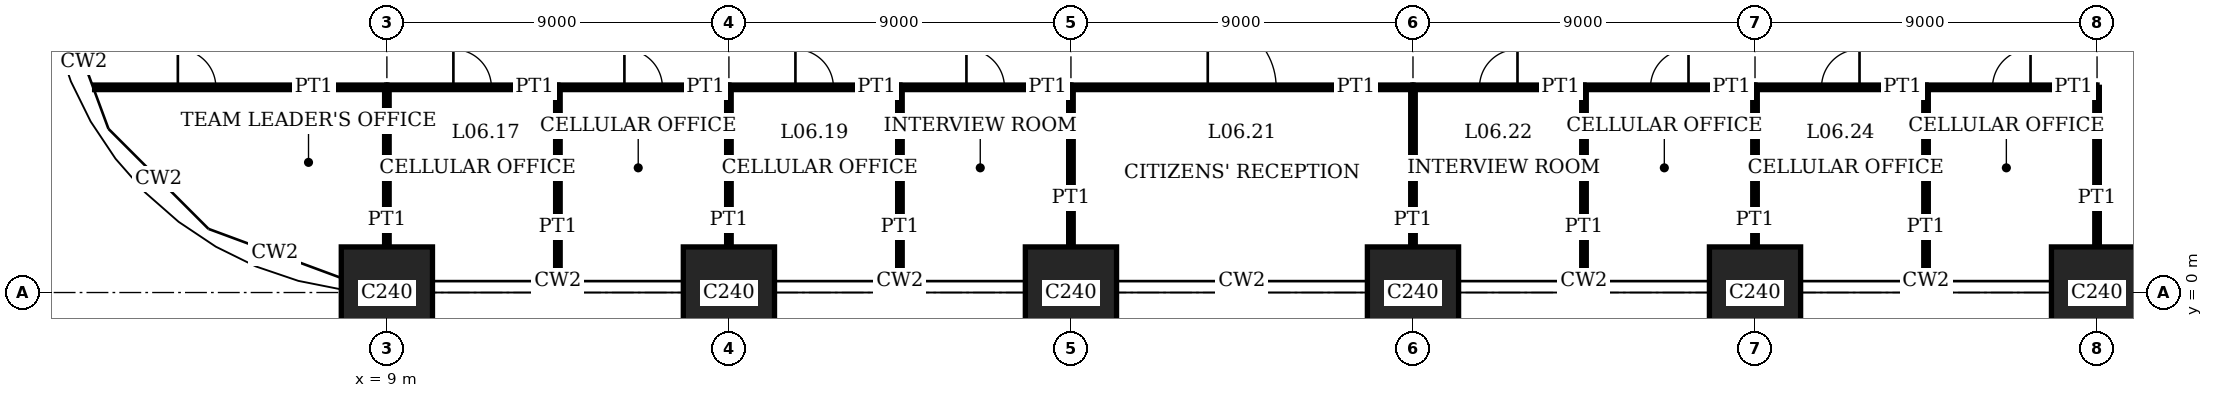
"""IFC4 building model, lengths in metres.
Left out: names, types, materials, properties, quantities, classifications, styles, units other than length and angle.
Written with IfcOpenShell. Run it as: python <this file> out.ifc"""

import sys

from ifc_helpers import new_model, si_unit, direction, frame, frame_2d, origin, origin_2d, place, context, subcontext, project, spatial, rectangle, extrude, element, fill, save


model = new_model("IFC4")
c1 = context("Model", 3, precision=1e-05, world=origin(), true_north=direction((0.0, 1.0)))
c2 = subcontext(c1, "Body", "Model", "MODEL_VIEW")
j1 = project(units=[si_unit("LENGTHUNIT", "METRE"), si_unit("PLANEANGLEUNIT", "RADIAN")], contexts=[c1])
p1 = place(None, origin())
s1 = spatial("IfcSite", under=j1, at=p1, CompositionType="ELEMENT")
p2 = place(p1, origin())
s2 = spatial("IfcBuilding", under=s1, at=p2, CompositionType="ELEMENT")
p3 = place(p2, frame((0.0, 0.0, 27.8)))
s3 = spatial("IfcBuildingStorey", under=s2, at=p3, CompositionType="ELEMENT", Elevation=27.8)
for number, where, z_axis, x_axis in (
    (1, (9.0, 0.0, 0.0), (0.0, 0.0, 1.0), (1.0, 0.0, 0.0)),
    (2, (18.0, 0.0, 0.0), (0.0, 0.0, 1.0), (1.0, 0.0, 0.0)),
    (3, (27.0, 0.0, 0.0), (0.0, 0.0, 1.0), (1.0, 0.0, 0.0)),
    (4, (36.0, 0.0, 0.0), (0.0, 0.0, 1.0), (1.0, 0.0, 0.0)),
    (5, (45.0, 0.0, 0.0), (0.0, 0.0, 1.0), (1.0, 0.0, 0.0)),
    (6, (54.0, 0.0, 0.0), (0.0, 0.0, 1.0), (1.0, 0.0, 0.0)),
):
    element("IfcColumn", number, at=place(p3, frame(where, z_axis=z_axis, x_axis=x_axis)), inside=s3, PredefinedType="COLUMN", context=c2, shape_type="SweptSolid", body=[
        extrude(rectangle(XDim=2.4, YDim=2.4, at=origin_2d()), origin(), (0.0, 0.0, 1.0), 4.0),
    ])
p4 = place(p3, frame((9.0, 5.4, 0.0), z_axis=(0.0, 0.0, 1.0), x_axis=(1.0, 0.0, 0.0)))
e7 = element("IfcWall", 7, at=p4, inside=s3, PredefinedType="PARTITIONING", context=c2, shape_type="SweptSolid", body=[
    extrude(rectangle(XDim=4.5, YDim=0.12, at=frame_2d((2.25, 0.0))), origin(), (0.0, 0.0, 1.0), 3.75),
])
p5 = place(p4, frame((1.75, 0.0, 0.0)))
e8 = element("IfcOpeningElement", 8, at=p5, cuts=e7, PredefinedType="OPENING", context=c2, shape_type="SweptSolid", body=[
    extrude(rectangle(XDim=1.0, YDim=2.4, at=frame_2d((0.5, 1.2))), frame((0.0, 0.07, 0.0), z_axis=(0.0, -1.0, 0.0), x_axis=(1.0, 0.0, 0.0)), (0.0, 0.0, 1.0), 0.14),
])
p6 = place(p3, frame((13.5, 5.4, 0.0), z_axis=(0.0, 0.0, 1.0), x_axis=(1.0, 0.0, 0.0)))
e9 = element("IfcWall", 9, at=p6, inside=s3, PredefinedType="PARTITIONING", context=c2, shape_type="SweptSolid", body=[
    extrude(rectangle(XDim=4.5, YDim=0.12, at=frame_2d((2.25, 0.0))), origin(), (0.0, 0.0, 1.0), 3.75),
])
p7 = place(p6, frame((1.75, 0.0, 0.0)))
e10 = element("IfcOpeningElement", 10, at=p7, cuts=e9, PredefinedType="OPENING", context=c2, shape_type="SweptSolid", body=[
    extrude(rectangle(XDim=1.0, YDim=2.4, at=frame_2d((0.5, 1.2))), frame((0.0, 0.07, 0.0), z_axis=(0.0, -1.0, 0.0), x_axis=(1.0, 0.0, 0.0)), (0.0, 0.0, 1.0), 0.14),
])
p8 = place(p3, frame((18.0, 5.4, 0.0), z_axis=(0.0, 0.0, 1.0), x_axis=(1.0, 0.0, 0.0)))
e11 = element("IfcWall", 11, at=p8, inside=s3, PredefinedType="PARTITIONING", context=c2, shape_type="SweptSolid", body=[
    extrude(rectangle(XDim=4.5, YDim=0.12, at=frame_2d((2.25, 0.0))), origin(), (0.0, 0.0, 1.0), 3.75),
])
p9 = place(p8, frame((1.75, 0.0, 0.0)))
e12 = element("IfcOpeningElement", 12, at=p9, cuts=e11, PredefinedType="OPENING", context=c2, shape_type="SweptSolid", body=[
    extrude(rectangle(XDim=1.0, YDim=2.4, at=frame_2d((0.5, 1.2))), frame((0.0, 0.07, 0.0), z_axis=(0.0, -1.0, 0.0), x_axis=(1.0, 0.0, 0.0)), (0.0, 0.0, 1.0), 0.14),
])
p10 = place(p3, frame((22.5, 5.4, 0.0), z_axis=(0.0, 0.0, 1.0), x_axis=(1.0, 0.0, 0.0)))
e13 = element("IfcWall", 13, at=p10, inside=s3, PredefinedType="PARTITIONING", context=c2, shape_type="SweptSolid", body=[
    extrude(rectangle(XDim=4.5, YDim=0.12, at=frame_2d((2.25, 0.0))), origin(), (0.0, 0.0, 1.0), 3.75),
])
p11 = place(p10, frame((1.75, 0.0, 0.0)))
e14 = element("IfcOpeningElement", 14, at=p11, cuts=e13, PredefinedType="OPENING", context=c2, shape_type="SweptSolid", body=[
    extrude(rectangle(XDim=1.0, YDim=2.4, at=frame_2d((0.5, 1.2))), frame((0.0, 0.07, 0.0), z_axis=(0.0, -1.0, 0.0), x_axis=(1.0, 0.0, 0.0)), (0.0, 0.0, 1.0), 0.14),
])
p12 = place(p3, frame((27.0, 5.4, 0.0), z_axis=(0.0, 0.0, 1.0), x_axis=(1.0, 0.0, 0.0)))
e15 = element("IfcWall", 15, at=p12, inside=s3, PredefinedType="PARTITIONING", context=c2, shape_type="SweptSolid", body=[
    extrude(rectangle(XDim=9.0, YDim=0.12, at=frame_2d((4.5, 0.0))), origin(), (0.0, 0.0, 1.0), 3.75),
])
p13 = place(p12, frame((3.6, 0.0, 0.0)))
e16 = element("IfcOpeningElement", 16, at=p13, cuts=e15, PredefinedType="OPENING", context=c2, shape_type="SweptSolid", body=[
    extrude(rectangle(XDim=1.8, YDim=2.4, at=frame_2d((0.9, 1.2))), frame((0.0, 0.07, 0.0), z_axis=(0.0, -1.0, 0.0), x_axis=(1.0, 0.0, 0.0)), (0.0, 0.0, 1.0), 0.14),
])
p14 = place(p3, frame((36.0, 5.4, 0.0), z_axis=(0.0, 0.0, 1.0), x_axis=(1.0, 0.0, 0.0)))
e17 = element("IfcWall", 17, at=p14, inside=s3, PredefinedType="PARTITIONING", context=c2, shape_type="SweptSolid", body=[
    extrude(rectangle(XDim=4.5, YDim=0.12, at=frame_2d((2.25, 0.0))), origin(), (0.0, 0.0, 1.0), 3.75),
])
p15 = place(p14, frame((1.75, 0.0, 0.0)))
e18 = element("IfcOpeningElement", 18, at=p15, cuts=e17, PredefinedType="OPENING", context=c2, shape_type="SweptSolid", body=[
    extrude(rectangle(XDim=1.0, YDim=2.4, at=frame_2d((0.5, 1.2))), frame((0.0, 0.07, 0.0), z_axis=(0.0, -1.0, 0.0), x_axis=(1.0, 0.0, 0.0)), (0.0, 0.0, 1.0), 0.14),
])
p16 = place(p3, frame((40.5, 5.4, 0.0), z_axis=(0.0, 0.0, 1.0), x_axis=(1.0, 0.0, 0.0)))
e19 = element("IfcWall", 19, at=p16, inside=s3, PredefinedType="PARTITIONING", context=c2, shape_type="SweptSolid", body=[
    extrude(rectangle(XDim=4.5, YDim=0.12, at=frame_2d((2.25, 0.0))), origin(), (0.0, 0.0, 1.0), 3.75),
])
p17 = place(p16, frame((1.75, 0.0, 0.0)))
e20 = element("IfcOpeningElement", 20, at=p17, cuts=e19, PredefinedType="OPENING", context=c2, shape_type="SweptSolid", body=[
    extrude(rectangle(XDim=1.0, YDim=2.4, at=frame_2d((0.5, 1.2))), frame((0.0, 0.07, 0.0), z_axis=(0.0, -1.0, 0.0), x_axis=(1.0, 0.0, 0.0)), (0.0, 0.0, 1.0), 0.14),
])
p18 = place(p3, frame((45.0, 5.4, 0.0), z_axis=(0.0, 0.0, 1.0), x_axis=(1.0, 0.0, 0.0)))
e21 = element("IfcWall", 21, at=p18, inside=s3, PredefinedType="PARTITIONING", context=c2, shape_type="SweptSolid", body=[
    extrude(rectangle(XDim=4.5, YDim=0.12, at=frame_2d((2.25, 0.0))), origin(), (0.0, 0.0, 1.0), 3.75),
])
p19 = place(p18, frame((1.75, 0.0, 0.0)))
e22 = element("IfcOpeningElement", 22, at=p19, cuts=e21, PredefinedType="OPENING", context=c2, shape_type="SweptSolid", body=[
    extrude(rectangle(XDim=1.0, YDim=2.4, at=frame_2d((0.5, 1.2))), frame((0.0, 0.07, 0.0), z_axis=(0.0, -1.0, 0.0), x_axis=(1.0, 0.0, 0.0)), (0.0, 0.0, 1.0), 0.14),
])
p20 = place(p3, frame((49.5, 5.4, 0.0), z_axis=(0.0, 0.0, 1.0), x_axis=(1.0, 0.0, 0.0)))
e23 = element("IfcWall", 23, at=p20, inside=s3, PredefinedType="PARTITIONING", context=c2, shape_type="SweptSolid", body=[
    extrude(rectangle(XDim=4.5, YDim=0.12, at=frame_2d((2.25, 0.0))), origin(), (0.0, 0.0, 1.0), 3.75),
])
p21 = place(p20, frame((1.75, 0.0, 0.0)))
e24 = element("IfcOpeningElement", 24, at=p21, cuts=e23, PredefinedType="OPENING", context=c2, shape_type="SweptSolid", body=[
    extrude(rectangle(XDim=1.0, YDim=2.4, at=frame_2d((0.5, 1.2))), frame((0.0, 0.07, 0.0), z_axis=(0.0, -1.0, 0.0), x_axis=(1.0, 0.0, 0.0)), (0.0, 0.0, 1.0), 0.14),
])
p22 = place(p3, frame((1.31, 5.4, 0.0), z_axis=(0.0, 0.0, 1.0), x_axis=(1.0, 0.0, 0.0)))
e25 = element("IfcWall", 25, at=p22, inside=s3, PredefinedType="PARTITIONING", context=c2, shape_type="SweptSolid", body=[
    extrude(rectangle(XDim=7.69, YDim=0.12, at=frame_2d((3.845, 0.0))), origin(), (0.0, 0.0, 1.0), 3.75),
])
p23 = place(p22, frame((2.19, 0.0, 0.0)))
e26 = element("IfcOpeningElement", 26, at=p23, cuts=e25, PredefinedType="OPENING", context=c2, shape_type="SweptSolid", body=[
    extrude(rectangle(XDim=1.0, YDim=2.4, at=frame_2d((0.5, 1.2))), frame((0.0, 0.07, 0.0), z_axis=(0.0, -1.0, 0.0), x_axis=(1.0, 0.0, 0.0)), (0.0, 0.0, 1.0), 0.14),
])
p24 = place(p3, frame((9.0, 1.2, 0.0), z_axis=(0.0, 0.0, 1.0), x_axis=(0.0, 1.0, 0.0)))
e27 = element("IfcWall", 27, at=p24, inside=s3, PredefinedType="PARTITIONING", context=c2, shape_type="SweptSolid", body=[
    extrude(rectangle(XDim=4.2, YDim=0.12, at=frame_2d((2.1, 0.0))), origin(), (0.0, 0.0, 1.0), 3.05),
])
p25 = place(p3, frame((13.5, 0.31, 0.0), z_axis=(0.0, 0.0, 1.0), x_axis=(0.0, 1.0, 0.0)))
e28 = element("IfcWall", 28, at=p25, inside=s3, PredefinedType="PARTITIONING", context=c2, shape_type="SweptSolid", body=[
    extrude(rectangle(XDim=5.09, YDim=0.12, at=frame_2d((2.545, 0.0))), origin(), (0.0, 0.0, 1.0), 3.75),
])
p26 = place(p3, frame((18.0, 1.2, 0.0), z_axis=(0.0, 0.0, 1.0), x_axis=(0.0, 1.0, 0.0)))
e29 = element("IfcWall", 29, at=p26, inside=s3, PredefinedType="PARTITIONING", context=c2, shape_type="SweptSolid", body=[
    extrude(rectangle(XDim=4.2, YDim=0.12, at=frame_2d((2.1, 0.0))), origin(), (0.0, 0.0, 1.0), 3.05),
])
p27 = place(p3, frame((22.5, 0.31, 0.0), z_axis=(0.0, 0.0, 1.0), x_axis=(0.0, 1.0, 0.0)))
e30 = element("IfcWall", 30, at=p27, inside=s3, PredefinedType="PARTITIONING", context=c2, shape_type="SweptSolid", body=[
    extrude(rectangle(XDim=5.09, YDim=0.12, at=frame_2d((2.545, 0.0))), origin(), (0.0, 0.0, 1.0), 3.75),
])
for number, where, z_axis, x_axis in (
    (31, (27.0, 1.2, 0.0), (0.0, 0.0, 1.0), (0.0, 1.0, 0.0)),
    (32, (36.0, 1.2, 0.0), (0.0, 0.0, 1.0), (0.0, 1.0, 0.0)),
):
    element("IfcWall", number, at=place(p3, frame(where, z_axis=z_axis, x_axis=x_axis)), inside=s3, PredefinedType="PARTITIONING", context=c2, shape_type="SweptSolid", body=[
        extrude(rectangle(XDim=4.2, YDim=0.12, at=frame_2d((2.1, 0.0))), origin(), (0.0, 0.0, 1.0), 3.05),
    ])
p28 = place(p3, frame((40.5, 0.31, 0.0), z_axis=(0.0, 0.0, 1.0), x_axis=(0.0, 1.0, 0.0)))
e33 = element("IfcWall", 33, at=p28, inside=s3, PredefinedType="PARTITIONING", context=c2, shape_type="SweptSolid", body=[
    extrude(rectangle(XDim=5.09, YDim=0.12, at=frame_2d((2.545, 0.0))), origin(), (0.0, 0.0, 1.0), 3.75),
])
p29 = place(p3, frame((45.0, 1.2, 0.0), z_axis=(0.0, 0.0, 1.0), x_axis=(0.0, 1.0, 0.0)))
e34 = element("IfcWall", 34, at=p29, inside=s3, PredefinedType="PARTITIONING", context=c2, shape_type="SweptSolid", body=[
    extrude(rectangle(XDim=4.2, YDim=0.12, at=frame_2d((2.1, 0.0))), origin(), (0.0, 0.0, 1.0), 3.05),
])
p30 = place(p3, frame((49.5, 0.31, 0.0), z_axis=(0.0, 0.0, 1.0), x_axis=(0.0, 1.0, 0.0)))
e35 = element("IfcWall", 35, at=p30, inside=s3, PredefinedType="PARTITIONING", context=c2, shape_type="SweptSolid", body=[
    extrude(rectangle(XDim=5.09, YDim=0.12, at=frame_2d((2.545, 0.0))), origin(), (0.0, 0.0, 1.0), 3.75),
])
p31 = place(p3, frame((54.0, 1.2, 0.0), z_axis=(0.0, 0.0, 1.0), x_axis=(0.0, 1.0, 0.0)))
e36 = element("IfcWall", 36, at=p31, inside=s3, PredefinedType="PARTITIONING", context=c2, shape_type="SweptSolid", body=[
    extrude(rectangle(XDim=4.2, YDim=0.12, at=frame_2d((2.1, 0.0))), origin(), (0.0, 0.0, 1.0), 3.05),
])
p32 = place(p5, origin())
e37 = element("IfcDoor", 37, at=p32, inside=s3, OperationType="SINGLE_SWING_RIGHT", PredefinedType="DOOR", context=c2, shape_type="SweptSolid", body=[
    extrude(rectangle(XDim=1.0, YDim=2.4, at=frame_2d((0.5, 1.2))), frame((0.0, 0.025, 0.0), z_axis=(0.0, -1.0, 0.0), x_axis=(1.0, 0.0, 0.0)), (0.0, 0.0, 1.0), 0.05),
])
fill(e8, e37)
p33 = place(p7, origin())
e38 = element("IfcDoor", 38, at=p33, inside=s3, OperationType="SINGLE_SWING_RIGHT", PredefinedType="DOOR", context=c2, shape_type="SweptSolid", body=[
    extrude(rectangle(XDim=1.0, YDim=2.4, at=frame_2d((0.5, 1.2))), frame((0.0, 0.025, 0.0), z_axis=(0.0, -1.0, 0.0), x_axis=(1.0, 0.0, 0.0)), (0.0, 0.0, 1.0), 0.05),
])
fill(e10, e38)
p34 = place(p9, origin())
e39 = element("IfcDoor", 39, at=p34, inside=s3, OperationType="SINGLE_SWING_RIGHT", PredefinedType="DOOR", context=c2, shape_type="SweptSolid", body=[
    extrude(rectangle(XDim=1.0, YDim=2.4, at=frame_2d((0.5, 1.2))), frame((0.0, 0.025, 0.0), z_axis=(0.0, -1.0, 0.0), x_axis=(1.0, 0.0, 0.0)), (0.0, 0.0, 1.0), 0.05),
])
fill(e12, e39)
p35 = place(p11, origin())
e40 = element("IfcDoor", 40, at=p35, inside=s3, OperationType="SINGLE_SWING_RIGHT", PredefinedType="DOOR", context=c2, shape_type="SweptSolid", body=[
    extrude(rectangle(XDim=1.0, YDim=2.4, at=frame_2d((0.5, 1.2))), frame((0.0, 0.025, 0.0), z_axis=(0.0, -1.0, 0.0), x_axis=(1.0, 0.0, 0.0)), (0.0, 0.0, 1.0), 0.05),
])
fill(e14, e40)
p36 = place(p13, origin())
e41 = element("IfcDoor", 41, at=p36, inside=s3, OperationType="DOUBLE_DOOR_SINGLE_SWING", PredefinedType="DOOR", context=c2, shape_type="SweptSolid", body=[
    extrude(rectangle(XDim=1.8, YDim=2.4, at=frame_2d((0.9, 1.2))), frame((0.0, 0.025, 0.0), z_axis=(0.0, -1.0, 0.0), x_axis=(1.0, 0.0, 0.0)), (0.0, 0.0, 1.0), 0.05),
])
fill(e16, e41)
p37 = place(p15, origin())
e42 = element("IfcDoor", 42, at=p37, inside=s3, OperationType="SINGLE_SWING_LEFT", PredefinedType="DOOR", context=c2, shape_type="SweptSolid", body=[
    extrude(rectangle(XDim=1.0, YDim=2.4, at=frame_2d((0.5, 1.2))), frame((0.0, 0.025, 0.0), z_axis=(0.0, -1.0, 0.0), x_axis=(1.0, 0.0, 0.0)), (0.0, 0.0, 1.0), 0.05),
])
fill(e18, e42)
p38 = place(p17, origin())
e43 = element("IfcDoor", 43, at=p38, inside=s3, OperationType="SINGLE_SWING_LEFT", PredefinedType="DOOR", context=c2, shape_type="SweptSolid", body=[
    extrude(rectangle(XDim=1.0, YDim=2.4, at=frame_2d((0.5, 1.2))), frame((0.0, 0.025, 0.0), z_axis=(0.0, -1.0, 0.0), x_axis=(1.0, 0.0, 0.0)), (0.0, 0.0, 1.0), 0.05),
])
fill(e20, e43)
p39 = place(p19, origin())
e44 = element("IfcDoor", 44, at=p39, inside=s3, OperationType="SINGLE_SWING_LEFT", PredefinedType="DOOR", context=c2, shape_type="SweptSolid", body=[
    extrude(rectangle(XDim=1.0, YDim=2.4, at=frame_2d((0.5, 1.2))), frame((0.0, 0.025, 0.0), z_axis=(0.0, -1.0, 0.0), x_axis=(1.0, 0.0, 0.0)), (0.0, 0.0, 1.0), 0.05),
])
fill(e22, e44)
p40 = place(p21, origin())
e45 = element("IfcDoor", 45, at=p40, inside=s3, OperationType="SINGLE_SWING_LEFT", PredefinedType="DOOR", context=c2, shape_type="SweptSolid", body=[
    extrude(rectangle(XDim=1.0, YDim=2.4, at=frame_2d((0.5, 1.2))), frame((0.0, 0.025, 0.0), z_axis=(0.0, -1.0, 0.0), x_axis=(1.0, 0.0, 0.0)), (0.0, 0.0, 1.0), 0.05),
])
fill(e24, e45)
p41 = place(p23, origin())
e46 = element("IfcDoor", 46, at=p41, inside=s3, OperationType="SINGLE_SWING_RIGHT", PredefinedType="DOOR", context=c2, shape_type="SweptSolid", body=[
    extrude(rectangle(XDim=1.0, YDim=2.4, at=frame_2d((0.5, 1.2))), frame((0.0, 0.025, 0.0), z_axis=(0.0, -1.0, 0.0), x_axis=(1.0, 0.0, 0.0)), (0.0, 0.0, 1.0), 0.05),
])
fill(e26, e46)
save(model, sys.argv[1])
